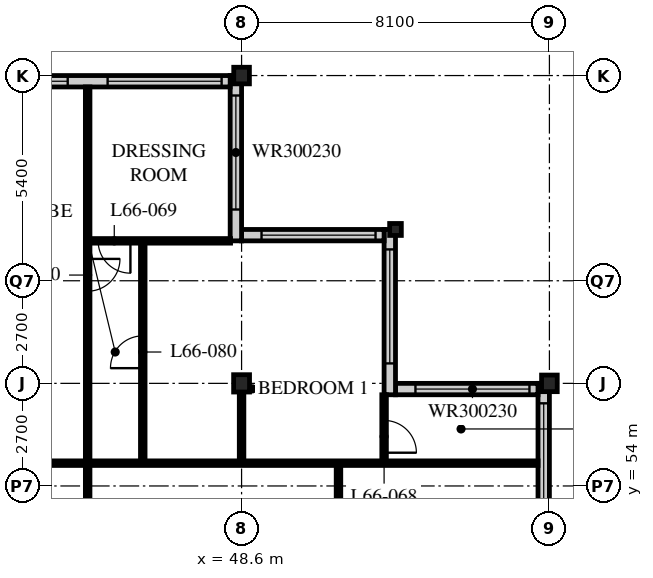
"""IFC4 building model, lengths in metres.
Left out: names, types, materials, properties, quantities, classifications, styles, units other than length and angle.
Written with IfcOpenShell. Run it as: python <this file> out.ifc"""

import sys

from ifc_helpers import new_model, si_unit, direction, frame, frame_2d, origin, origin_2d, place, context, subcontext, project, spatial, rectangle, i_section, extrude, element, fill, save


model = new_model("IFC4")
c1 = context("Model", 3, precision=1e-05, world=origin(), true_north=direction((0.0, 1.0)))
c2 = subcontext(c1, "Body", "Model", "MODEL_VIEW")
j1 = project(units=[si_unit("LENGTHUNIT", "METRE"), si_unit("PLANEANGLEUNIT", "RADIAN")], contexts=[c1])
p1 = place(None, origin())
s1 = spatial("IfcSite", under=j1, at=p1, CompositionType="ELEMENT")
p2 = place(p1, origin())
s2 = spatial("IfcBuilding", under=s1, at=p2, CompositionType="ELEMENT")
p3 = place(p2, frame((0.0, 0.0, 258.0)))
s3 = spatial("IfcBuildingStorey", under=s2, at=p3, CompositionType="ELEMENT", Elevation=258.0)
p4 = place(p3, frame((48.6, 56.7, 0.0), z_axis=(0.0, 0.0, 1.0), x_axis=(1.0, 0.0, 0.0)))
e1 = element("IfcColumn", 1, at=p4, inside=s3, PredefinedType="COLUMN", context=c2, shape_type="SweptSolid", body=[
    extrude(i_section(OverallWidth=0.418, OverallDepth=0.456, WebThickness=0.042, FlangeThickness=0.067, FilletRadius=0.015, at=origin_2d()), origin(), (0.0, 0.0, 1.0), 3.9),
])
p5 = place(p3, frame((48.6, 64.8, 0.0), z_axis=(0.0, 0.0, 1.0), x_axis=(1.0, 0.0, 0.0)))
e2 = element("IfcColumn", 2, at=p5, inside=s3, PredefinedType="COLUMN", context=c2, shape_type="SweptSolid", body=[
    extrude(i_section(OverallWidth=0.412, OverallDepth=0.437, WebThickness=0.036, FlangeThickness=0.058, FilletRadius=0.015, at=origin_2d()), origin(), (0.0, 0.0, 1.0), 3.9),
])
p6 = place(p3, frame((52.65, 60.75, 0.0), z_axis=(0.0, 0.0, 1.0), x_axis=(1.0, 0.0, 0.0)))
e3 = element("IfcColumn", 3, at=p6, inside=s3, PredefinedType="COLUMN", context=c2, shape_type="SweptSolid", body=[
    extrude(i_section(OverallWidth=0.307, OverallDepth=0.314, WebThickness=0.012, FlangeThickness=0.019, FilletRadius=0.015, at=origin_2d()), origin(), (0.0, 0.0, 1.0), 3.9),
])
p7 = place(p3, frame((56.7, 56.7, 0.0), z_axis=(0.0, 0.0, 1.0), x_axis=(1.0, 0.0, 0.0)))
e4 = element("IfcColumn", 4, at=p7, inside=s3, PredefinedType="COLUMN", context=c2, shape_type="SweptSolid", body=[
    extrude(i_section(OverallWidth=0.412, OverallDepth=0.437, WebThickness=0.036, FlangeThickness=0.058, FilletRadius=0.015, at=origin_2d()), origin(), (0.0, 0.0, 1.0), 3.9),
])
p8 = place(p3, frame((56.55, 24.6, 0.0), z_axis=(0.0, 0.0, 1.0), x_axis=(0.0, 1.0, 0.0)))
e5 = element("IfcWall", 5, at=p8, inside=s3, PredefinedType="SOLIDWALL", context=c2, shape_type="SweptSolid", body=[
    extrude(rectangle(XDim=32.1, YDim=0.3, at=frame_2d((16.05, 0.0))), origin(), (0.0, 0.0, 1.0), 3.69),
])
p9 = place(p8, frame((0.225, 0.0, 0.6)))
e6 = element("IfcOpeningElement", 6, at=p9, cuts=e5, PredefinedType="OPENING", context=c2, shape_type="SweptSolid", body=[
    extrude(rectangle(XDim=3.0, YDim=2.4, at=frame_2d((1.5, 1.2))), frame((0.0, 0.16, 0.0), z_axis=(0.0, -1.0, 0.0), x_axis=(1.0, 0.0, 0.0)), (0.0, 0.0, 1.0), 0.32),
])
p10 = place(p8, frame((4.275, 0.0, 0.6)))
e7 = element("IfcOpeningElement", 7, at=p10, cuts=e5, PredefinedType="OPENING", context=c2, shape_type="SweptSolid", body=[
    extrude(rectangle(XDim=3.0, YDim=2.4, at=frame_2d((1.5, 1.2))), frame((0.0, 0.16, 0.0), z_axis=(0.0, -1.0, 0.0), x_axis=(1.0, 0.0, 0.0)), (0.0, 0.0, 1.0), 0.32),
])
p11 = place(p8, frame((8.325, 0.0, 0.6)))
e8 = element("IfcOpeningElement", 8, at=p11, cuts=e5, PredefinedType="OPENING", context=c2, shape_type="SweptSolid", body=[
    extrude(rectangle(XDim=3.0, YDim=2.4, at=frame_2d((1.5, 1.2))), frame((0.0, 0.16, 0.0), z_axis=(0.0, -1.0, 0.0), x_axis=(1.0, 0.0, 0.0)), (0.0, 0.0, 1.0), 0.32),
])
p12 = place(p8, frame((12.375, 0.0, 0.6)))
e9 = element("IfcOpeningElement", 9, at=p12, cuts=e5, PredefinedType="OPENING", context=c2, shape_type="SweptSolid", body=[
    extrude(rectangle(XDim=3.0, YDim=2.4, at=frame_2d((1.5, 1.2))), frame((0.0, 0.16, 0.0), z_axis=(0.0, -1.0, 0.0), x_axis=(1.0, 0.0, 0.0)), (0.0, 0.0, 1.0), 0.32),
])
p13 = place(p8, frame((16.425, 0.0, 0.6)))
e10 = element("IfcOpeningElement", 10, at=p13, cuts=e5, PredefinedType="OPENING", context=c2, shape_type="SweptSolid", body=[
    extrude(rectangle(XDim=3.0, YDim=2.4, at=frame_2d((1.5, 1.2))), frame((0.0, 0.16, 0.0), z_axis=(0.0, -1.0, 0.0), x_axis=(1.0, 0.0, 0.0)), (0.0, 0.0, 1.0), 0.32),
])
p14 = place(p8, frame((20.475, 0.0, 0.6)))
e11 = element("IfcOpeningElement", 11, at=p14, cuts=e5, PredefinedType="OPENING", context=c2, shape_type="SweptSolid", body=[
    extrude(rectangle(XDim=3.0, YDim=2.4, at=frame_2d((1.5, 1.2))), frame((0.0, 0.16, 0.0), z_axis=(0.0, -1.0, 0.0), x_axis=(1.0, 0.0, 0.0)), (0.0, 0.0, 1.0), 0.32),
])
p15 = place(p8, frame((24.525, 0.0, 0.6)))
e12 = element("IfcOpeningElement", 12, at=p15, cuts=e5, PredefinedType="OPENING", context=c2, shape_type="SweptSolid", body=[
    extrude(rectangle(XDim=3.0, YDim=2.4, at=frame_2d((1.5, 1.2))), frame((0.0, 0.16, 0.0), z_axis=(0.0, -1.0, 0.0), x_axis=(1.0, 0.0, 0.0)), (0.0, 0.0, 1.0), 0.32),
])
p16 = place(p8, frame((28.575, 0.0, 0.6)))
e13 = element("IfcOpeningElement", 13, at=p16, cuts=e5, PredefinedType="OPENING", context=c2, shape_type="SweptSolid", body=[
    extrude(rectangle(XDim=3.0, YDim=2.4, at=frame_2d((1.5, 1.2))), frame((0.0, 0.16, 0.0), z_axis=(0.0, -1.0, 0.0), x_axis=(1.0, 0.0, 0.0)), (0.0, 0.0, 1.0), 0.32),
])
p17 = place(p3, frame((56.4, 56.55, 0.0), z_axis=(0.0, 0.0, 1.0), x_axis=(-1.0, 0.0, 0.0)))
e14 = element("IfcWall", 14, at=p17, inside=s3, PredefinedType="SOLIDWALL", context=c2, shape_type="SweptSolid", body=[
    extrude(rectangle(XDim=3.75, YDim=0.3, at=frame_2d((1.875, 0.0))), origin(), (0.0, 0.0, 1.0), 3.69),
])
p18 = place(p17, frame((0.225, 0.0, 0.6)))
e15 = element("IfcOpeningElement", 15, at=p18, cuts=e14, PredefinedType="OPENING", context=c2, shape_type="SweptSolid", body=[
    extrude(rectangle(XDim=3.0, YDim=2.3, at=frame_2d((1.5, 1.15))), frame((0.0, 0.16, 0.0), z_axis=(0.0, -1.0, 0.0), x_axis=(1.0, 0.0, 0.0)), (0.0, 0.0, 1.0), 0.32),
])
p19 = place(p3, frame((52.5, 56.4, 0.0), z_axis=(0.0, 0.0, 1.0), x_axis=(0.0, 1.0, 0.0)))
e16 = element("IfcWall", 16, at=p19, inside=s3, PredefinedType="SOLIDWALL", context=c2, shape_type="SweptSolid", body=[
    extrude(rectangle(XDim=4.35, YDim=0.3, at=frame_2d((2.175, 0.0))), origin(), (0.0, 0.0, 1.0), 3.69),
])
p20 = place(p19, frame((0.825, 0.0, 0.6)))
e17 = element("IfcOpeningElement", 17, at=p20, cuts=e16, PredefinedType="OPENING", context=c2, shape_type="SweptSolid", body=[
    extrude(rectangle(XDim=3.0, YDim=2.3, at=frame_2d((1.5, 1.15))), frame((0.0, 0.16, 0.0), z_axis=(0.0, -1.0, 0.0), x_axis=(1.0, 0.0, 0.0)), (0.0, 0.0, 1.0), 0.32),
])
p21 = place(p3, frame((52.35, 60.6, 0.0), z_axis=(0.0, 0.0, 1.0), x_axis=(-1.0, 0.0, 0.0)))
e18 = element("IfcWall", 18, at=p21, inside=s3, PredefinedType="SOLIDWALL", context=c2, shape_type="SweptSolid", body=[
    extrude(rectangle(XDim=3.75, YDim=0.3, at=frame_2d((1.875, 0.0))), origin(), (0.0, 0.0, 1.0), 3.69),
])
p22 = place(p21, frame((0.225, 0.0, 0.6)))
e19 = element("IfcOpeningElement", 19, at=p22, cuts=e18, PredefinedType="OPENING", context=c2, shape_type="SweptSolid", body=[
    extrude(rectangle(XDim=3.0, YDim=2.3, at=frame_2d((1.5, 1.15))), frame((0.0, 0.16, 0.0), z_axis=(0.0, -1.0, 0.0), x_axis=(1.0, 0.0, 0.0)), (0.0, 0.0, 1.0), 0.32),
])
p23 = place(p3, frame((48.45, 60.45, 0.0), z_axis=(0.0, 0.0, 1.0), x_axis=(0.0, 1.0, 0.0)))
e20 = element("IfcWall", 20, at=p23, inside=s3, PredefinedType="SOLIDWALL", context=c2, shape_type="SweptSolid", body=[
    extrude(rectangle(XDim=4.35, YDim=0.3, at=frame_2d((2.175, 0.0))), origin(), (0.0, 0.0, 1.0), 3.69),
])
p24 = place(p23, frame((0.825, 0.0, 0.6)))
e21 = element("IfcOpeningElement", 21, at=p24, cuts=e20, PredefinedType="OPENING", context=c2, shape_type="SweptSolid", body=[
    extrude(rectangle(XDim=3.0, YDim=2.3, at=frame_2d((1.5, 1.15))), frame((0.0, 0.16, 0.0), z_axis=(0.0, -1.0, 0.0), x_axis=(1.0, 0.0, 0.0)), (0.0, 0.0, 1.0), 0.32),
])
p25 = place(p3, frame((48.3, 64.65, 0.0), z_axis=(0.0, 0.0, 1.0), x_axis=(-1.0, 0.0, 0.0)))
e22 = element("IfcWall", 22, at=p25, inside=s3, PredefinedType="SOLIDWALL", context=c2, shape_type="SweptSolid", body=[
    extrude(rectangle(XDim=40.2, YDim=0.3, at=frame_2d((20.1, 0.0))), origin(), (0.0, 0.0, 1.0), 3.69),
])
p26 = place(p25, frame((0.225, 0.0, 0.6)))
e23 = element("IfcOpeningElement", 23, at=p26, cuts=e22, PredefinedType="OPENING", context=c2, shape_type="SweptSolid", body=[
    extrude(rectangle(XDim=3.0, YDim=2.4, at=frame_2d((1.5, 1.2))), frame((0.0, 0.16, 0.0), z_axis=(0.0, -1.0, 0.0), x_axis=(1.0, 0.0, 0.0)), (0.0, 0.0, 1.0), 0.32),
])
p27 = place(p25, frame((4.275, 0.0, 0.6)))
e24 = element("IfcOpeningElement", 24, at=p27, cuts=e22, PredefinedType="OPENING", context=c2, shape_type="SweptSolid", body=[
    extrude(rectangle(XDim=3.0, YDim=2.4, at=frame_2d((1.5, 1.2))), frame((0.0, 0.16, 0.0), z_axis=(0.0, -1.0, 0.0), x_axis=(1.0, 0.0, 0.0)), (0.0, 0.0, 1.0), 0.32),
])
p28 = place(p25, frame((8.325, 0.0, 0.6)))
e25 = element("IfcOpeningElement", 25, at=p28, cuts=e22, PredefinedType="OPENING", context=c2, shape_type="SweptSolid", body=[
    extrude(rectangle(XDim=3.0, YDim=2.4, at=frame_2d((1.5, 1.2))), frame((0.0, 0.16, 0.0), z_axis=(0.0, -1.0, 0.0), x_axis=(1.0, 0.0, 0.0)), (0.0, 0.0, 1.0), 0.32),
])
p29 = place(p25, frame((12.375, 0.0, 0.6)))
e26 = element("IfcOpeningElement", 26, at=p29, cuts=e22, PredefinedType="OPENING", context=c2, shape_type="SweptSolid", body=[
    extrude(rectangle(XDim=3.0, YDim=2.4, at=frame_2d((1.5, 1.2))), frame((0.0, 0.16, 0.0), z_axis=(0.0, -1.0, 0.0), x_axis=(1.0, 0.0, 0.0)), (0.0, 0.0, 1.0), 0.32),
])
p30 = place(p25, frame((16.425, 0.0, 0.6)))
e27 = element("IfcOpeningElement", 27, at=p30, cuts=e22, PredefinedType="OPENING", context=c2, shape_type="SweptSolid", body=[
    extrude(rectangle(XDim=3.0, YDim=2.4, at=frame_2d((1.5, 1.2))), frame((0.0, 0.16, 0.0), z_axis=(0.0, -1.0, 0.0), x_axis=(1.0, 0.0, 0.0)), (0.0, 0.0, 1.0), 0.32),
])
p31 = place(p25, frame((20.475, 0.0, 0.6)))
e28 = element("IfcOpeningElement", 28, at=p31, cuts=e22, PredefinedType="OPENING", context=c2, shape_type="SweptSolid", body=[
    extrude(rectangle(XDim=3.0, YDim=2.4, at=frame_2d((1.5, 1.2))), frame((0.0, 0.16, 0.0), z_axis=(0.0, -1.0, 0.0), x_axis=(1.0, 0.0, 0.0)), (0.0, 0.0, 1.0), 0.32),
])
p32 = place(p25, frame((24.525, 0.0, 0.6)))
e29 = element("IfcOpeningElement", 29, at=p32, cuts=e22, PredefinedType="OPENING", context=c2, shape_type="SweptSolid", body=[
    extrude(rectangle(XDim=3.0, YDim=2.4, at=frame_2d((1.5, 1.2))), frame((0.0, 0.16, 0.0), z_axis=(0.0, -1.0, 0.0), x_axis=(1.0, 0.0, 0.0)), (0.0, 0.0, 1.0), 0.32),
])
p33 = place(p25, frame((28.575, 0.0, 0.6)))
e30 = element("IfcOpeningElement", 30, at=p33, cuts=e22, PredefinedType="OPENING", context=c2, shape_type="SweptSolid", body=[
    extrude(rectangle(XDim=3.0, YDim=2.4, at=frame_2d((1.5, 1.2))), frame((0.0, 0.16, 0.0), z_axis=(0.0, -1.0, 0.0), x_axis=(1.0, 0.0, 0.0)), (0.0, 0.0, 1.0), 0.32),
])
p34 = place(p25, frame((32.625, 0.0, 0.6)))
e31 = element("IfcOpeningElement", 31, at=p34, cuts=e22, PredefinedType="OPENING", context=c2, shape_type="SweptSolid", body=[
    extrude(rectangle(XDim=3.0, YDim=2.4, at=frame_2d((1.5, 1.2))), frame((0.0, 0.16, 0.0), z_axis=(0.0, -1.0, 0.0), x_axis=(1.0, 0.0, 0.0)), (0.0, 0.0, 1.0), 0.32),
])
p35 = place(p25, frame((36.675, 0.0, 0.6)))
e32 = element("IfcOpeningElement", 32, at=p35, cuts=e22, PredefinedType="OPENING", context=c2, shape_type="SweptSolid", body=[
    extrude(rectangle(XDim=3.0, YDim=2.4, at=frame_2d((1.5, 1.2))), frame((0.0, 0.16, 0.0), z_axis=(0.0, -1.0, 0.0), x_axis=(1.0, 0.0, 0.0)), (0.0, 0.0, 1.0), 0.32),
])
p36 = place(p3, frame((36.45, 54.6, 0.0), z_axis=(0.0, 0.0, 1.0), x_axis=(1.0, 0.0, 0.0)))
e33 = element("IfcWall", 33, at=p36, inside=s3, PredefinedType="PARTITIONING", context=c2, shape_type="SweptSolid", body=[
    extrude(rectangle(XDim=19.95, YDim=0.12, at=frame_2d((9.975, 0.0))), origin(), (0.0, 0.0, 1.0), 3.69),
])
p37 = place(p36, frame((1.675, 0.0, 0.0)))
e34 = element("IfcOpeningElement", 34, at=p37, cuts=e33, PredefinedType="OPENING", context=c2, shape_type="SweptSolid", body=[
    extrude(rectangle(XDim=0.85, YDim=2.1, at=frame_2d((0.425, 1.05))), frame((0.0, 0.07, 0.0), z_axis=(0.0, -1.0, 0.0), x_axis=(1.0, 0.0, 0.0)), (0.0, 0.0, 1.0), 0.14),
])
p38 = place(p3, frame((44.55, 64.5, 0.0), z_axis=(0.0, 0.0, 1.0), x_axis=(0.0, -1.0, 0.0)))
e35 = element("IfcWall", 35, at=p38, inside=s3, PredefinedType="PARTITIONING", context=c2, shape_type="SweptSolid", body=[
    extrude(rectangle(XDim=17.7, YDim=0.12, at=frame_2d((8.85, 0.0))), origin(), (0.0, 0.0, 1.0), 3.69),
])
p39 = place(p38, frame((12.475, 0.0, 0.0)))
e36 = element("IfcOpeningElement", 36, at=p39, cuts=e35, PredefinedType="OPENING", context=c2, shape_type="SweptSolid", body=[
    extrude(rectangle(XDim=0.85, YDim=2.1, at=frame_2d((0.425, 1.05))), frame((0.0, 0.07, 0.0), z_axis=(0.0, -1.0, 0.0), x_axis=(1.0, 0.0, 0.0)), (0.0, 0.0, 1.0), 0.14),
])
p40 = place(p38, frame((4.525, 0.0, 0.0)))
e37 = element("IfcOpeningElement", 37, at=p40, cuts=e35, PredefinedType="OPENING", context=c2, shape_type="SweptSolid", body=[
    extrude(rectangle(XDim=0.85, YDim=2.1, at=frame_2d((0.425, 1.05))), frame((0.0, 0.07, 0.0), z_axis=(0.0, -1.0, 0.0), x_axis=(1.0, 0.0, 0.0)), (0.0, 0.0, 1.0), 0.14),
])
p41 = place(p3, frame((52.35, 54.6, 0.0), z_axis=(0.0, 0.0, 1.0), x_axis=(0.0, 1.0, 0.0)))
e38 = element("IfcWall", 38, at=p41, inside=s3, PredefinedType="PARTITIONING", context=c2, shape_type="SweptSolid", body=[
    extrude(rectangle(XDim=1.8, YDim=0.12, at=frame_2d((0.9, 0.0))), origin(), (0.0, 0.0, 1.0), 3.69),
])
p42 = place(p41, frame((0.275, 0.0, 0.0)))
e39 = element("IfcOpeningElement", 39, at=p42, cuts=e38, PredefinedType="OPENING", context=c2, shape_type="SweptSolid", body=[
    extrude(rectangle(XDim=0.85, YDim=2.1, at=frame_2d((0.425, 1.05))), frame((0.0, 0.07, 0.0), z_axis=(0.0, -1.0, 0.0), x_axis=(1.0, 0.0, 0.0)), (0.0, 0.0, 1.0), 0.14),
])
p43 = place(p3, frame((48.31, 60.45, 0.0), z_axis=(0.0, 0.0, 1.0), x_axis=(-1.0, 0.0, 0.0)))
e40 = element("IfcWall", 40, at=p43, inside=s3, PredefinedType="PARTITIONING", context=c2, shape_type="SweptSolid", body=[
    extrude(rectangle(XDim=3.76, YDim=0.12, at=frame_2d((1.88, 0.0))), origin(), (0.0, 0.0, 1.0), 3.69),
])
p44 = place(p43, frame((2.635, 0.0, 0.0)))
e41 = element("IfcOpeningElement", 41, at=p44, cuts=e40, PredefinedType="OPENING", context=c2, shape_type="SweptSolid", body=[
    extrude(rectangle(XDim=0.85, YDim=2.1, at=frame_2d((0.425, 1.05))), frame((0.0, 0.07, 0.0), z_axis=(0.0, -1.0, 0.0), x_axis=(1.0, 0.0, 0.0)), (0.0, 0.0, 1.0), 0.14),
])
p45 = place(p3, frame((51.15, 46.8, 0.0), z_axis=(0.0, 0.0, 1.0), x_axis=(0.0, 1.0, 0.0)))
e42 = element("IfcWall", 42, at=p45, inside=s3, PredefinedType="PARTITIONING", context=c2, shape_type="SweptSolid", body=[
    extrude(rectangle(XDim=7.8, YDim=0.12, at=frame_2d((3.9, 0.0))), origin(), (0.0, 0.0, 1.0), 3.69),
])
p46 = place(p45, frame((3.475, 0.0, 0.0)))
e43 = element("IfcOpeningElement", 43, at=p46, cuts=e42, PredefinedType="OPENING", context=c2, shape_type="SweptSolid", body=[
    extrude(rectangle(XDim=0.85, YDim=2.1, at=frame_2d((0.425, 1.05))), frame((0.0, 0.07, 0.0), z_axis=(0.0, -1.0, 0.0), x_axis=(1.0, 0.0, 0.0)), (0.0, 0.0, 1.0), 0.14),
])
p47 = place(p3, frame((46.0, 54.6, 0.0), z_axis=(0.0, 0.0, 1.0), x_axis=(0.0, 1.0, 0.0)))
e44 = element("IfcWall", 44, at=p47, inside=s3, PredefinedType="PARTITIONING", context=c2, shape_type="SweptSolid", body=[
    extrude(rectangle(XDim=5.85, YDim=0.12, at=frame_2d((2.925, 0.0))), origin(), (0.0, 0.0, 1.0), 3.69),
])
p48 = place(p47, frame((2.5, 0.0, 0.0)))
e45 = element("IfcOpeningElement", 45, at=p48, cuts=e44, PredefinedType="OPENING", context=c2, shape_type="SweptSolid", body=[
    extrude(rectangle(XDim=0.85, YDim=2.1, at=frame_2d((0.425, 1.05))), frame((0.0, 0.07, 0.0), z_axis=(0.0, -1.0, 0.0), x_axis=(1.0, 0.0, 0.0)), (0.0, 0.0, 1.0), 0.14),
])
p49 = place(p3, frame((48.6, 54.6, 0.0), z_axis=(0.0, 0.0, 1.0), x_axis=(0.0, 1.0, 0.0)))
e46 = element("IfcWall", 46, at=p49, inside=s3, PredefinedType="PARTITIONING", context=c2, shape_type="SweptSolid", body=[
    extrude(rectangle(XDim=1.897, YDim=0.12, at=frame_2d((0.948, 0.0))), origin(), (0.0, 0.0, 1.0), 3.078),
])
p50 = place(p16, origin())
e47 = element("IfcWindow", 47, at=p50, inside=s3, PartitioningType="SINGLE_PANEL", PredefinedType="WINDOW", context=c2, shape_type="SweptSolid", body=[
    extrude(rectangle(XDim=3.0, YDim=2.4, at=frame_2d((1.5, 1.2))), frame((0.0, 0.03, 0.0), z_axis=(0.0, -1.0, 0.0), x_axis=(1.0, 0.0, 0.0)), (0.0, 0.0, 1.0), 0.06),
])
fill(e13, e47)
p51 = place(p18, origin())
e48 = element("IfcWindow", 48, at=p51, inside=s3, PartitioningType="SINGLE_PANEL", PredefinedType="WINDOW", context=c2, shape_type="SweptSolid", body=[
    extrude(rectangle(XDim=3.0, YDim=2.3, at=frame_2d((1.5, 1.15))), frame((0.0, 0.03, 0.0), z_axis=(0.0, -1.0, 0.0), x_axis=(1.0, 0.0, 0.0)), (0.0, 0.0, 1.0), 0.06),
])
fill(e15, e48)
p52 = place(p20, origin())
e49 = element("IfcWindow", 49, at=p52, inside=s3, PartitioningType="SINGLE_PANEL", PredefinedType="WINDOW", context=c2, shape_type="SweptSolid", body=[
    extrude(rectangle(XDim=3.0, YDim=2.3, at=frame_2d((1.5, 1.15))), frame((0.0, 0.03, 0.0), z_axis=(0.0, -1.0, 0.0), x_axis=(1.0, 0.0, 0.0)), (0.0, 0.0, 1.0), 0.06),
])
fill(e17, e49)
p53 = place(p22, origin())
e50 = element("IfcWindow", 50, at=p53, inside=s3, PartitioningType="SINGLE_PANEL", PredefinedType="WINDOW", context=c2, shape_type="SweptSolid", body=[
    extrude(rectangle(XDim=3.0, YDim=2.3, at=frame_2d((1.5, 1.15))), frame((0.0, 0.03, 0.0), z_axis=(0.0, -1.0, 0.0), x_axis=(1.0, 0.0, 0.0)), (0.0, 0.0, 1.0), 0.06),
])
fill(e19, e50)
p54 = place(p24, origin())
e51 = element("IfcWindow", 51, at=p54, inside=s3, PartitioningType="SINGLE_PANEL", PredefinedType="WINDOW", context=c2, shape_type="SweptSolid", body=[
    extrude(rectangle(XDim=3.0, YDim=2.3, at=frame_2d((1.5, 1.15))), frame((0.0, 0.03, 0.0), z_axis=(0.0, -1.0, 0.0), x_axis=(1.0, 0.0, 0.0)), (0.0, 0.0, 1.0), 0.06),
])
fill(e21, e51)
p55 = place(p26, origin())
e52 = element("IfcWindow", 52, at=p55, inside=s3, PartitioningType="SINGLE_PANEL", PredefinedType="WINDOW", context=c2, shape_type="SweptSolid", body=[
    extrude(rectangle(XDim=3.0, YDim=2.4, at=frame_2d((1.5, 1.2))), frame((0.0, 0.03, 0.0), z_axis=(0.0, -1.0, 0.0), x_axis=(1.0, 0.0, 0.0)), (0.0, 0.0, 1.0), 0.06),
])
fill(e23, e52)
p56 = place(p27, origin())
e53 = element("IfcWindow", 53, at=p56, inside=s3, PartitioningType="SINGLE_PANEL", PredefinedType="WINDOW", context=c2, shape_type="SweptSolid", body=[
    extrude(rectangle(XDim=3.0, YDim=2.4, at=frame_2d((1.5, 1.2))), frame((0.0, 0.03, 0.0), z_axis=(0.0, -1.0, 0.0), x_axis=(1.0, 0.0, 0.0)), (0.0, 0.0, 1.0), 0.06),
])
fill(e24, e53)
p57 = place(p40, origin())
e54 = element("IfcDoor", 54, at=p57, inside=s3, OperationType="SINGLE_SWING_LEFT", PredefinedType="DOOR", context=c2, shape_type="SweptSolid", body=[
    extrude(rectangle(XDim=0.85, YDim=2.1, at=frame_2d((0.425, 1.05))), frame((0.0, 0.025, 0.0), z_axis=(0.0, -1.0, 0.0), x_axis=(1.0, 0.0, 0.0)), (0.0, 0.0, 1.0), 0.05),
])
fill(e37, e54)
p58 = place(p42, origin())
e55 = element("IfcDoor", 55, at=p58, inside=s3, OperationType="SINGLE_SWING_RIGHT", PredefinedType="DOOR", context=c2, shape_type="SweptSolid", body=[
    extrude(rectangle(XDim=0.85, YDim=2.1, at=frame_2d((0.425, 1.05))), frame((0.0, 0.025, 0.0), z_axis=(0.0, -1.0, 0.0), x_axis=(1.0, 0.0, 0.0)), (0.0, 0.0, 1.0), 0.05),
])
fill(e39, e55)
p59 = place(p44, origin())
e56 = element("IfcDoor", 56, at=p59, inside=s3, OperationType="SINGLE_SWING_LEFT", PredefinedType="DOOR", context=c2, shape_type="SweptSolid", body=[
    extrude(rectangle(XDim=0.85, YDim=2.1, at=frame_2d((0.425, 1.05))), frame((0.0, 0.025, 0.0), z_axis=(0.0, -1.0, 0.0), x_axis=(1.0, 0.0, 0.0)), (0.0, 0.0, 1.0), 0.05),
])
fill(e41, e56)
p60 = place(p48, origin())
e57 = element("IfcDoor", 57, at=p60, inside=s3, OperationType="SINGLE_SWING_LEFT", PredefinedType="DOOR", context=c2, shape_type="SweptSolid", body=[
    extrude(rectangle(XDim=0.85, YDim=2.1, at=frame_2d((0.425, 1.05))), frame((0.0, 0.025, 0.0), z_axis=(0.0, -1.0, 0.0), x_axis=(1.0, 0.0, 0.0)), (0.0, 0.0, 1.0), 0.05),
])
fill(e45, e57)
save(model, sys.argv[1])
